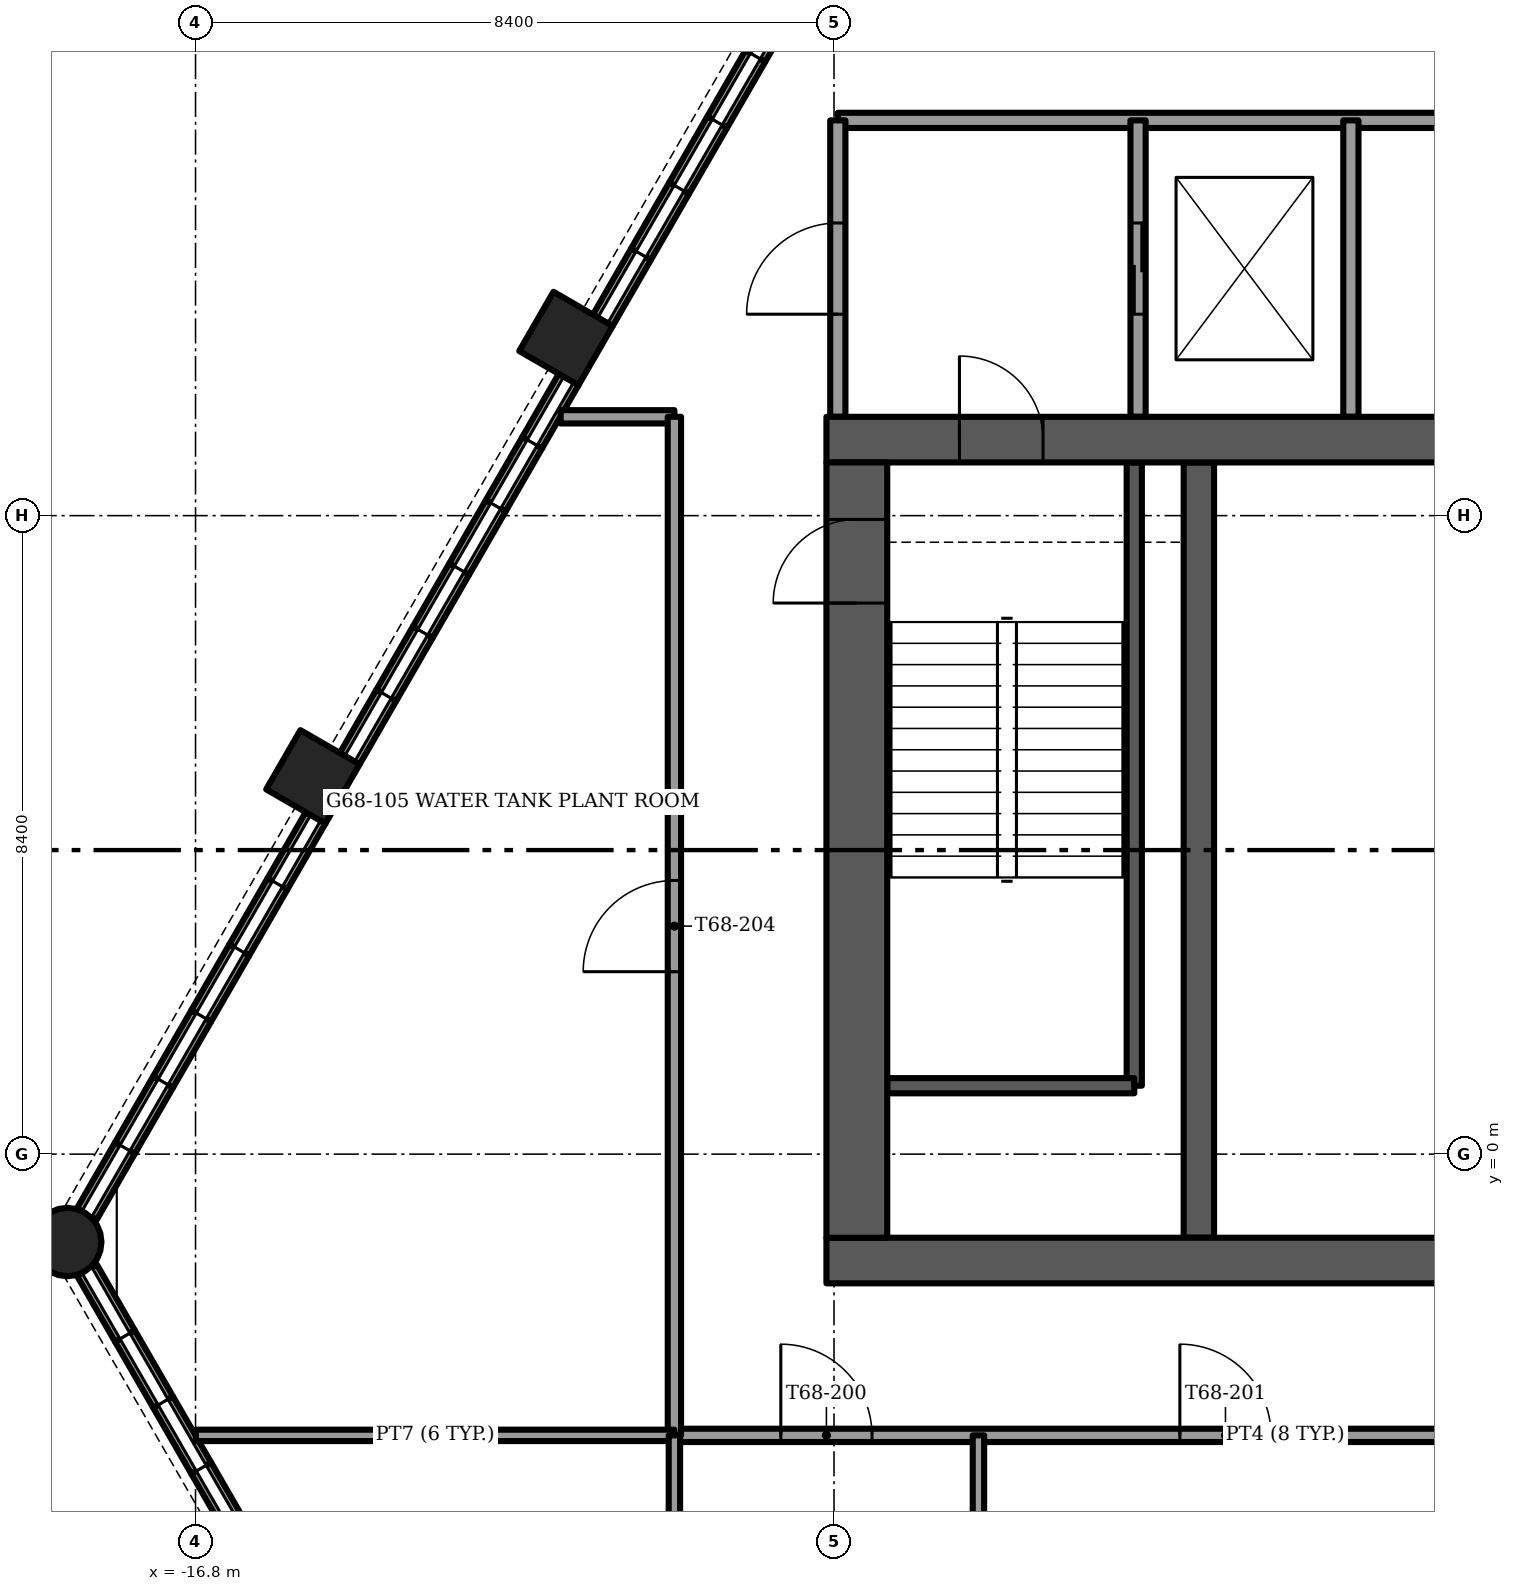
"""IFC4 building model, lengths in metres.
Left out: names, types, materials, properties, quantities, classifications, styles, units other than length and angle.
Written with IfcOpenShell. Run it as: python <this file> out.ifc"""

import sys

from ifc_helpers import new_model, si_unit, direction, frame, frame_2d, origin, origin_2d, place, context, subcontext, project, spatial, rectangle, circle, extrude, element, fill, save


model = new_model("IFC4")
c1 = context("Model", 3, precision=1e-05, world=origin(), true_north=direction((0.0, 1.0)))
c2 = subcontext(c1, "Body", "Model", "MODEL_VIEW")
j1 = project(units=[si_unit("LENGTHUNIT", "METRE"), si_unit("PLANEANGLEUNIT", "RADIAN")], contexts=[c1])
p1 = place(None, origin())
s1 = spatial("IfcSite", under=j1, at=p1, CompositionType="ELEMENT")
p2 = place(p1, origin())
s2 = spatial("IfcBuilding", under=s1, at=p2, CompositionType="ELEMENT")
p3 = place(p2, frame((0.0, 0.0, 275.0)))
s3 = spatial("IfcBuildingStorey", under=s2, at=p3, CompositionType="ELEMENT", Elevation=275.0)
p4 = place(p3, frame((-8.5, -1.4, -0.3), z_axis=(0.0, 0.0, 1.0), x_axis=(1.0, 0.0, 0.0)))
e1 = element("IfcWall", 1, at=p4, inside=s3, PredefinedType="SHEAR", context=c2, shape_type="SweptSolid", body=[
    extrude(rectangle(XDim=17.0, YDim=0.6, at=frame_2d((8.5, 0.0))), origin(), (0.0, 0.0, 1.0), 4.5),
])
p5 = place(p3, frame((-8.5, 9.4, -0.3), z_axis=(0.0, 0.0, 1.0), x_axis=(1.0, 0.0, 0.0)))
e2 = element("IfcWall", 2, at=p5, inside=s3, PredefinedType="SHEAR", context=c2, shape_type="SweptSolid", body=[
    extrude(rectangle(XDim=17.0, YDim=0.6, at=frame_2d((8.5, 0.0))), origin(), (0.0, 0.0, 1.0), 4.5),
])
p6 = place(p5, frame((1.75, 0.0, 0.0)))
e3 = element("IfcOpeningElement", 3, at=p6, cuts=e2, PredefinedType="OPENING", context=c2, shape_type="SweptSolid", body=[
    extrude(rectangle(XDim=1.1, YDim=2.1, at=frame_2d((0.55, 1.05))), frame((0.0, 0.3, 0.0), z_axis=(0.0, -1.0, 0.0), x_axis=(1.0, 0.0, 0.0)), (0.0, 0.0, 1.0), 0.6),
])
p7 = place(p5, frame((14.15, 0.0, 0.0)))
e4 = element("IfcOpeningElement", 4, at=p7, cuts=e2, PredefinedType="OPENING", context=c2, shape_type="SweptSolid", body=[
    extrude(rectangle(XDim=1.1, YDim=2.1, at=frame_2d((0.55, 1.05))), frame((0.0, 0.3, 0.0), z_axis=(0.0, -1.0, 0.0), x_axis=(1.0, 0.0, 0.0)), (0.0, 0.0, 1.0), 0.6),
])
p8 = place(p3, frame((-8.1, -1.1, -0.3), z_axis=(0.0, 0.0, 1.0), x_axis=(0.0, 1.0, 0.0)))
e5 = element("IfcWall", 5, at=p8, inside=s3, PredefinedType="SHEAR", context=c2, shape_type="SweptSolid", body=[
    extrude(rectangle(XDim=10.2, YDim=0.8, at=frame_2d((5.1, 0.0))), origin(), (0.0, 0.0, 1.0), 4.5),
])
p9 = place(p8, frame((8.35, 0.0, 0.0)))
e6 = element("IfcOpeningElement", 6, at=p9, cuts=e5, PredefinedType="OPENING", context=c2, shape_type="SweptSolid", body=[
    extrude(rectangle(XDim=1.1, YDim=2.1, at=frame_2d((0.55, 1.05))), frame((0.0, 0.4, 0.0), z_axis=(0.0, -1.0, 0.0), x_axis=(1.0, 0.0, 0.0)), (0.0, 0.0, 1.0), 0.8),
])
p10 = place(p3, frame((-3.6, -1.1, -0.3), z_axis=(0.0, 0.0, 1.0), x_axis=(0.0, 1.0, 0.0)))
e7 = element("IfcWall", 7, at=p10, inside=s3, PredefinedType="SHEAR", context=c2, shape_type="SweptSolid", body=[
    extrude(rectangle(XDim=10.2, YDim=0.4, at=frame_2d((5.1, 0.0))), origin(), (0.0, 0.0, 1.0), 4.5),
])
p11 = place(p3, frame((-18.487, -1.156, -1.2), z_axis=(0.0, 0.0, 1.0), x_axis=(1.0, 0.0, 0.0)))
e8 = element("IfcColumn", 8, at=p11, inside=s3, PredefinedType="COLUMN", context=c2, shape_type="SweptSolid", body=[
    extrude(circle(Radius=0.45, at=origin_2d()), origin(), (0.0, 0.0, 1.0), 4.5),
])
for number, where, z_axis, x_axis in (
    (9, (-11.926, 10.73, -1.2), (0.0, 0.0, 1.0), (0.5, 0.866, 0.0)),
    (10, (-15.256, 4.963, -1.2), (0.0, 0.0, 1.0), (0.5, 0.866, 0.0)),
):
    element("IfcColumn", number, at=place(p3, frame(where, z_axis=z_axis, x_axis=x_axis)), inside=s3, PredefinedType="COLUMN", context=c2, shape_type="SweptSolid", body=[
        extrude(rectangle(XDim=0.9, YDim=0.9, at=origin_2d()), origin(), (0.0, 0.0, 1.0), 4.5),
    ])
p12 = place(p3, frame((-8.934, 15.314, 0.0), z_axis=(0.0, 0.0, 1.0), x_axis=(-0.500038395149, -0.8660032352, 0.0)))
e11 = element("IfcWall", 11, at=p12, inside=s3, PredefinedType="SOLIDWALL", context=c2, shape_type="SweptSolid", body=[
    extrude(rectangle(XDim=1.003, YDim=0.3, at=frame_2d((0.502, 0.0))), origin(), (0.0, 0.0, 1.0), 1.0),
])
p13 = place(p3, frame((-9.435, 14.445, 0.0), z_axis=(0.0, 0.0, 1.0), x_axis=(-0.499961250474, -0.866047774678, 0.0)))
e12 = element("IfcWall", 12, at=p13, inside=s3, PredefinedType="SOLIDWALL", context=c2, shape_type="SweptSolid", body=[
    extrude(rectangle(XDim=1.003, YDim=0.3, at=frame_2d((0.501, 0.0))), origin(), (0.0, 0.0, 1.0), 1.0),
])
for number, where, z_axis, x_axis in (
    (13, (-9.937, 13.576, 0.0), (0.0, 0.0, 1.0), (-0.5, -0.866, 0.0)),
    (14, (-10.438, 12.707, 0.0), (0.0, 0.0, 1.0), (-0.5, -0.866, 0.0)),
    (15, (-10.94, 11.839, 0.0), (0.0, 0.0, 1.0), (-0.5, -0.866, 0.0)),
):
    element("IfcWall", number, at=place(p3, frame(where, z_axis=z_axis, x_axis=x_axis)), inside=s3, PredefinedType="SOLIDWALL", context=c2, shape_type="SweptSolid", body=[
        extrude(rectangle(XDim=1.003, YDim=0.3, at=frame_2d((0.501, 0.0))), origin(), (0.0, 0.0, 1.0), 1.0),
    ])
for number, where, z_axis, x_axis in (
    (16, (-11.892, 10.19, 0.0), (0.0, 0.0, 1.0), (-0.5, -0.866, 0.0)),
    (17, (-12.371, 9.359, 0.0), (0.0, 0.0, 1.0), (-0.5, -0.866, 0.0)),
):
    element("IfcWall", number, at=place(p3, frame(where, z_axis=z_axis, x_axis=x_axis)), inside=s3, PredefinedType="SOLIDWALL", context=c2, shape_type="SweptSolid", body=[
        extrude(rectangle(XDim=0.96, YDim=0.3, at=frame_2d((0.48, 0.0))), origin(), (0.0, 0.0, 1.0), 1.0),
    ])
p14 = place(p3, frame((-12.851, 8.528, 0.0), z_axis=(0.0, 0.0, 1.0), x_axis=(-0.500023335103, -0.866011930837, 0.0)))
e18 = element("IfcWall", 18, at=p14, inside=s3, PredefinedType="SOLIDWALL", context=c2, shape_type="SweptSolid", body=[
    extrude(rectangle(XDim=0.96, YDim=0.3, at=frame_2d((0.48, 0.0))), origin(), (0.0, 0.0, 1.0), 1.0),
])
p15 = place(p3, frame((-13.331, 7.697, 0.0), z_axis=(0.0, 0.0, 1.0), x_axis=(-0.499832553123, -0.866122057702, 0.0)))
e19 = element("IfcWall", 19, at=p15, inside=s3, PredefinedType="SOLIDWALL", context=c2, shape_type="SweptSolid", body=[
    extrude(rectangle(XDim=0.96, YDim=0.3, at=frame_2d((0.48, 0.0))), origin(), (0.0, 0.0, 1.0), 1.0),
])
p16 = place(p3, frame((-13.811, 6.865, 0.0), z_axis=(0.0, 0.0, 1.0), x_axis=(-0.500023335103, -0.866011930837, 0.0)))
e20 = element("IfcWall", 20, at=p16, inside=s3, PredefinedType="SOLIDWALL", context=c2, shape_type="SweptSolid", body=[
    extrude(rectangle(XDim=0.96, YDim=0.3, at=frame_2d((0.48, 0.0))), origin(), (0.0, 0.0, 1.0), 1.0),
])
p17 = place(p3, frame((-14.291, 6.034, 0.0), z_axis=(0.0, 0.0, 1.0), x_axis=(-0.500133489192, -0.865948320045, 0.0)))
e21 = element("IfcWall", 21, at=p17, inside=s3, PredefinedType="SOLIDWALL", context=c2, shape_type="SweptSolid", body=[
    extrude(rectangle(XDim=0.96, YDim=0.3, at=frame_2d((0.48, 0.0))), origin(), (0.0, 0.0, 1.0), 1.0),
])
p18 = place(p3, frame((-15.221, 4.424, 0.0), z_axis=(0.0, 0.0, 1.0), x_axis=(-0.499961250474, -0.866047774678, 0.0)))
e22 = element("IfcWall", 22, at=p18, inside=s3, PredefinedType="SOLIDWALL", context=c2, shape_type="SweptSolid", body=[
    extrude(rectangle(XDim=1.003, YDim=0.3, at=frame_2d((0.501, 0.0))), origin(), (0.0, 0.0, 1.0), 1.0),
])
p19 = place(p3, frame((-15.722, 3.555, 0.0), z_axis=(0.0, 0.0, 1.0), x_axis=(-0.500143783026, -0.865942374699, 0.0)))
e23 = element("IfcWall", 23, at=p19, inside=s3, PredefinedType="SOLIDWALL", context=c2, shape_type="SweptSolid", body=[
    extrude(rectangle(XDim=1.003, YDim=0.3, at=frame_2d((0.501, 0.0))), origin(), (0.0, 0.0, 1.0), 1.0),
])
for number, where, z_axis, x_axis in (
    (24, (-16.224, 2.686, 0.0), (0.0, 0.0, 1.0), (-0.5, -0.866, 0.0)),
    (25, (-16.726, 1.818, 0.0), (0.0, 0.0, 1.0), (-0.5, -0.866, 0.0)),
    (26, (-17.227, 0.949, 0.0), (0.0, 0.0, 1.0), (-0.5, -0.866, 0.0)),
    (27, (-17.729, 0.08, 0.0), (0.0, 0.0, 1.0), (-0.5, -0.866, 0.0)),
):
    element("IfcWall", number, at=place(p3, frame(where, z_axis=z_axis, x_axis=x_axis)), inside=s3, PredefinedType="SOLIDWALL", context=c2, shape_type="SweptSolid", body=[
        extrude(rectangle(XDim=1.003, YDim=0.3, at=frame_2d((0.501, 0.0))), origin(), (0.0, 0.0, 1.0), 1.0),
    ])
p20 = place(p3, frame((-18.23, -1.525, 0.0), z_axis=(0.0, 0.0, 1.0), x_axis=(0.500010157896, -0.866019539041, 0.0)))
e28 = element("IfcWall", 28, at=p20, inside=s3, PredefinedType="SOLIDWALL", context=c2, shape_type="SweptSolid", body=[
    extrude(rectangle(XDim=1.004, YDim=0.3, at=frame_2d((0.502, 0.0))), origin(), (0.0, 0.0, 1.0), 1.0),
])
p21 = place(p3, frame((-17.728, -2.394, 0.0), z_axis=(0.0, 0.0, 1.0), x_axis=(0.499933044277, -0.866064057238, 0.0)))
e29 = element("IfcWall", 29, at=p21, inside=s3, PredefinedType="SOLIDWALL", context=c2, shape_type="SweptSolid", body=[
    extrude(rectangle(XDim=1.004, YDim=0.3, at=frame_2d((0.502, 0.0))), origin(), (0.0, 0.0, 1.0), 1.0),
])
p22 = place(p3, frame((-17.226, -3.263, 0.0), z_axis=(0.0, 0.0, 1.0), x_axis=(0.499904868165, -0.866080321209, 0.0)))
e30 = element("IfcWall", 30, at=p22, inside=s3, PredefinedType="SOLIDWALL", context=c2, shape_type="SweptSolid", body=[
    extrude(rectangle(XDim=1.004, YDim=0.3, at=frame_2d((0.502, 0.0))), origin(), (0.0, 0.0, 1.0), 1.0),
])
p23 = place(p3, frame((-16.724, -4.133, 0.0), z_axis=(0.0, 0.0, 1.0), x_axis=(0.500115484592, -0.865958718457, 0.0)))
e31 = element("IfcWall", 31, at=p23, inside=s3, PredefinedType="SOLIDWALL", context=c2, shape_type="SweptSolid", body=[
    extrude(rectangle(XDim=1.004, YDim=0.3, at=frame_2d((0.502, 0.0))), origin(), (0.0, 0.0, 1.0), 1.0),
])
p24 = place(p3, frame((-10.5, -3.7, 0.0), z_axis=(0.0, 0.0, 1.0), x_axis=(1.0, 0.0, 0.0)))
e32 = element("IfcWall", 32, at=p24, inside=s3, PredefinedType="PARTITIONING", context=c2, shape_type="SweptSolid", body=[
    extrude(rectangle(XDim=16.07, YDim=0.175, at=frame_2d((8.035, 0.0))), origin(), (0.0, 0.0, 1.0), 4.2),
])
p25 = place(p24, frame((1.4, 0.0, 0.0)))
e33 = element("IfcOpeningElement", 33, at=p25, cuts=e32, PredefinedType="OPENING", context=c2, shape_type="SweptSolid", body=[
    extrude(rectangle(XDim=1.2, YDim=2.1, at=frame_2d((0.6, 1.05))), frame((0.0, 0.087, 0.0), z_axis=(0.0, -1.0, 0.0), x_axis=(1.0, 0.0, 0.0)), (0.0, 0.0, 1.0), 0.175),
])
p26 = place(p24, frame((6.65, 0.0, 0.0)))
e34 = element("IfcOpeningElement", 34, at=p26, cuts=e32, PredefinedType="OPENING", context=c2, shape_type="SweptSolid", body=[
    extrude(rectangle(XDim=1.2, YDim=2.1, at=frame_2d((0.6, 1.05))), frame((0.0, 0.087, 0.0), z_axis=(0.0, -1.0, 0.0), x_axis=(1.0, 0.0, 0.0)), (0.0, 0.0, 1.0), 0.175),
])
p27 = place(p24, frame((12.685, 0.0, 0.0)))
e35 = element("IfcOpeningElement", 35, at=p27, cuts=e32, PredefinedType="OPENING", context=c2, shape_type="SweptSolid", body=[
    extrude(rectangle(XDim=1.2, YDim=2.1, at=frame_2d((0.6, 1.05))), frame((0.0, 0.087, 0.0), z_axis=(0.0, -1.0, 0.0), x_axis=(1.0, 0.0, 0.0)), (0.0, 0.0, 1.0), 0.175),
])
p28 = place(p3, frame((-11.996, 9.7, 0.0), z_axis=(0.0, 0.0, 1.0), x_axis=(1.0, 0.0, 0.0)))
e36 = element("IfcWall", 36, at=p28, inside=s3, PredefinedType="PARTITIONING", context=c2, shape_type="SweptSolid", body=[
    extrude(rectangle(XDim=1.496, YDim=0.175, at=frame_2d((0.748, 0.0))), origin(), (0.0, 0.0, 1.0), 4.2),
])
p29 = place(p3, frame((-10.5, -3.7, 0.0), z_axis=(0.0, 0.0, 1.0), x_axis=(0.0, 1.0, 0.0)))
e37 = element("IfcWall", 37, at=p29, inside=s3, PredefinedType="PARTITIONING", context=c2, shape_type="SweptSolid", body=[
    extrude(rectangle(XDim=13.4, YDim=0.175, at=frame_2d((6.7, 0.0))), origin(), (0.0, 0.0, 1.0), 4.2),
])
p30 = place(p29, frame((6.1, 0.0, 0.0)))
e38 = element("IfcOpeningElement", 38, at=p30, cuts=e37, PredefinedType="OPENING", context=c2, shape_type="SweptSolid", body=[
    extrude(rectangle(XDim=1.2, YDim=2.1, at=frame_2d((0.6, 1.05))), frame((0.0, 0.087, 0.0), z_axis=(0.0, -1.0, 0.0), x_axis=(1.0, 0.0, 0.0)), (0.0, 0.0, 1.0), 0.175),
])
p31 = place(p3, frame((-16.796, -3.7, 0.0), z_axis=(0.0, 0.0, 1.0), x_axis=(1.0, 0.0, 0.0)))
e39 = element("IfcWall", 39, at=p31, inside=s3, PredefinedType="PARTITIONING", context=c2, shape_type="SweptSolid", body=[
    extrude(rectangle(XDim=6.296, YDim=0.15, at=frame_2d((3.148, 0.0))), origin(), (0.0, 0.0, 1.0), 4.2),
])
p32 = place(p3, frame((-10.5, -11.454, 0.0), z_axis=(0.0, 0.0, 1.0), x_axis=(0.0, 1.0, 0.0)))
e40 = element("IfcWall", 40, at=p32, inside=s3, PredefinedType="PARTITIONING", context=c2, shape_type="SweptSolid", body=[
    extrude(rectangle(XDim=7.754, YDim=0.15, at=frame_2d((3.877, 0.0))), origin(), (0.0, 0.0, 1.0), 4.067),
])
p33 = place(p32, frame((3.277, 0.0, 0.0)))
e41 = element("IfcOpeningElement", 41, at=p33, cuts=e40, PredefinedType="OPENING", context=c2, shape_type="SweptSolid", body=[
    extrude(rectangle(XDim=1.2, YDim=2.1, at=frame_2d((0.6, 1.05))), frame((0.0, 0.075, 0.0), z_axis=(0.0, -1.0, 0.0), x_axis=(1.0, 0.0, 0.0)), (0.0, 0.0, 1.0), 0.15),
])
p34 = place(p3, frame((-6.5, -11.454, 0.0), z_axis=(0.0, 0.0, 1.0), x_axis=(0.0, 1.0, 0.0)))
e42 = element("IfcWall", 42, at=p34, inside=s3, PredefinedType="PARTITIONING", context=c2, shape_type="SweptSolid", body=[
    extrude(rectangle(XDim=7.754, YDim=0.15, at=frame_2d((3.877, 0.0))), origin(), (0.0, 0.0, 1.0), 4.067),
])
p35 = place(p3, frame((-4.45, 0.9, -0.3), z_axis=(0.0, 0.0, 1.0), x_axis=(0.0, 1.0, 0.0)))
e43 = element("IfcWall", 43, at=p35, inside=s3, PredefinedType="SOLIDWALL", context=c2, shape_type="SweptSolid", body=[
    extrude(rectangle(XDim=8.2, YDim=0.2, at=frame_2d((4.1, 0.0))), origin(), (0.0, 0.0, 1.0), 4.5),
])
p36 = place(p3, frame((-7.7, 0.9, -0.3), z_axis=(0.0, 0.0, 1.0), x_axis=(1.0, 0.0, 0.0)))
e44 = element("IfcWall", 44, at=p36, inside=s3, PredefinedType="SOLIDWALL", context=c2, shape_type="SweptSolid", body=[
    extrude(rectangle(XDim=3.25, YDim=0.2, at=frame_2d((1.625, 0.0))), origin(), (0.0, 0.0, 1.0), 4.5),
])
p37 = place(p3, frame((-8.35, 13.6, 0.0), z_axis=(0.0, 0.0, 1.0), x_axis=(1.0, 0.0, 0.0)))
e45 = element("IfcWall", 45, at=p37, inside=s3, PredefinedType="PARTITIONING", context=c2, shape_type="SweptSolid", body=[
    extrude(rectangle(XDim=16.7, YDim=0.2, at=frame_2d((8.35, 0.0))), origin(), (0.0, 0.0, 1.0), 4.2),
])
p38 = place(p3, frame((-8.35, 9.7, 0.0), z_axis=(0.0, 0.0, 1.0), x_axis=(0.0, 1.0, 0.0)))
e46 = element("IfcWall", 46, at=p38, inside=s3, PredefinedType="PARTITIONING", context=c2, shape_type="SweptSolid", body=[
    extrude(rectangle(XDim=3.9, YDim=0.2, at=frame_2d((1.95, 0.0))), origin(), (0.0, 0.0, 1.0), 4.2),
])
p39 = place(p38, frame((1.35, 0.0, 0.0)))
e47 = element("IfcOpeningElement", 47, at=p39, cuts=e46, PredefinedType="OPENING", context=c2, shape_type="SweptSolid", body=[
    extrude(rectangle(XDim=1.2, YDim=2.1, at=frame_2d((0.6, 1.05))), frame((0.0, 0.1, 0.0), z_axis=(0.0, -1.0, 0.0), x_axis=(1.0, 0.0, 0.0)), (0.0, 0.0, 1.0), 0.2),
])
p40 = place(p3, frame((-4.4, 9.7, 0.0), z_axis=(0.0, 0.0, 1.0), x_axis=(0.0, 1.0, 0.0)))
e48 = element("IfcWall", 48, at=p40, inside=s3, PredefinedType="PARTITIONING", context=c2, shape_type="SweptSolid", body=[
    extrude(rectangle(XDim=3.9, YDim=0.2, at=frame_2d((1.95, 0.0))), origin(), (0.0, 0.0, 1.0), 4.2),
])
p41 = place(p40, frame((1.35, 0.0, 0.0)))
e49 = element("IfcOpeningElement", 49, at=p41, cuts=e48, PredefinedType="OPENING", context=c2, shape_type="SweptSolid", body=[
    extrude(rectangle(XDim=1.2, YDim=2.1, at=frame_2d((0.6, 1.05))), frame((0.0, 0.1, 0.0), z_axis=(0.0, -1.0, 0.0), x_axis=(1.0, 0.0, 0.0)), (0.0, 0.0, 1.0), 0.2),
])
p42 = place(p3, frame((-1.6, 9.7, 0.0), z_axis=(0.0, 0.0, 1.0), x_axis=(0.0, 1.0, 0.0)))
e50 = element("IfcWall", 50, at=p42, inside=s3, PredefinedType="PARTITIONING", context=c2, shape_type="SweptSolid", body=[
    extrude(rectangle(XDim=3.9, YDim=0.2, at=frame_2d((1.95, 0.0))), origin(), (0.0, 0.0, 1.0), 4.2),
])
p43 = place(p25, origin())
e51 = element("IfcDoor", 51, at=p43, inside=s3, OperationType="SINGLE_SWING_RIGHT", PredefinedType="DOOR", context=c2, shape_type="SweptSolid", body=[
    extrude(rectangle(XDim=1.2, YDim=2.1, at=frame_2d((0.6, 1.05))), frame((0.0, 0.025, 0.0), z_axis=(0.0, -1.0, 0.0), x_axis=(1.0, 0.0, 0.0)), (0.0, 0.0, 1.0), 0.05),
])
fill(e33, e51)
p44 = place(p26, origin())
e52 = element("IfcDoor", 52, at=p44, inside=s3, OperationType="SINGLE_SWING_LEFT", PredefinedType="DOOR", context=c2, shape_type="SweptSolid", body=[
    extrude(rectangle(XDim=1.2, YDim=2.1, at=frame_2d((0.6, 1.05))), frame((0.0, 0.025, 0.0), z_axis=(0.0, -1.0, 0.0), x_axis=(1.0, 0.0, 0.0)), (0.0, 0.0, 1.0), 0.05),
])
fill(e34, e52)
p45 = place(p30, origin())
e53 = element("IfcDoor", 53, at=p45, inside=s3, OperationType="SINGLE_SWING_RIGHT", PredefinedType="DOOR", context=c2, shape_type="SweptSolid", body=[
    extrude(rectangle(XDim=1.2, YDim=2.1, at=frame_2d((0.6, 1.05))), frame((0.0, 0.025, 0.0), z_axis=(0.0, -1.0, 0.0), x_axis=(1.0, 0.0, 0.0)), (0.0, 0.0, 1.0), 0.05),
])
fill(e38, e53)
p46 = place(p6, origin())
e54 = element("IfcDoor", 54, at=p46, inside=s3, OperationType="SINGLE_SWING_LEFT", PredefinedType="DOOR", context=c2, shape_type="SweptSolid", body=[
    extrude(rectangle(XDim=1.1, YDim=2.1, at=frame_2d((0.55, 1.05))), frame((0.0, 0.025, 0.0), z_axis=(0.0, -1.0, 0.0), x_axis=(1.0, 0.0, 0.0)), (0.0, 0.0, 1.0), 0.05),
])
fill(e3, e54)
p47 = place(p9, origin())
e55 = element("IfcDoor", 55, at=p47, inside=s3, OperationType="SINGLE_SWING_RIGHT", PredefinedType="DOOR", context=c2, shape_type="SweptSolid", body=[
    extrude(rectangle(XDim=1.1, YDim=2.1, at=frame_2d((0.55, 1.05))), frame((0.0, 0.025, 0.0), z_axis=(0.0, -1.0, 0.0), x_axis=(1.0, 0.0, 0.0)), (0.0, 0.0, 1.0), 0.05),
])
fill(e6, e55)
p48 = place(p41, origin())
e56 = element("IfcDoor", 56, at=p48, inside=s3, OperationType="SLIDING_TO_LEFT", PredefinedType="DOOR", context=c2, shape_type="SweptSolid", body=[
    extrude(rectangle(XDim=1.2, YDim=2.1, at=frame_2d((0.6, 1.05))), frame((0.0, 0.025, 0.0), z_axis=(0.0, -1.0, 0.0), x_axis=(1.0, 0.0, 0.0)), (0.0, 0.0, 1.0), 0.05),
])
fill(e49, e56)
p49 = place(p39, origin())
e57 = element("IfcDoor", 57, at=p49, inside=s3, OperationType="SINGLE_SWING_LEFT", PredefinedType="DOOR", context=c2, shape_type="SweptSolid", body=[
    extrude(rectangle(XDim=1.2, YDim=2.1, at=frame_2d((0.6, 1.05))), frame((0.0, 0.025, 0.0), z_axis=(0.0, -1.0, 0.0), x_axis=(1.0, 0.0, 0.0)), (0.0, 0.0, 1.0), 0.05),
])
fill(e47, e57)
save(model, sys.argv[1])
